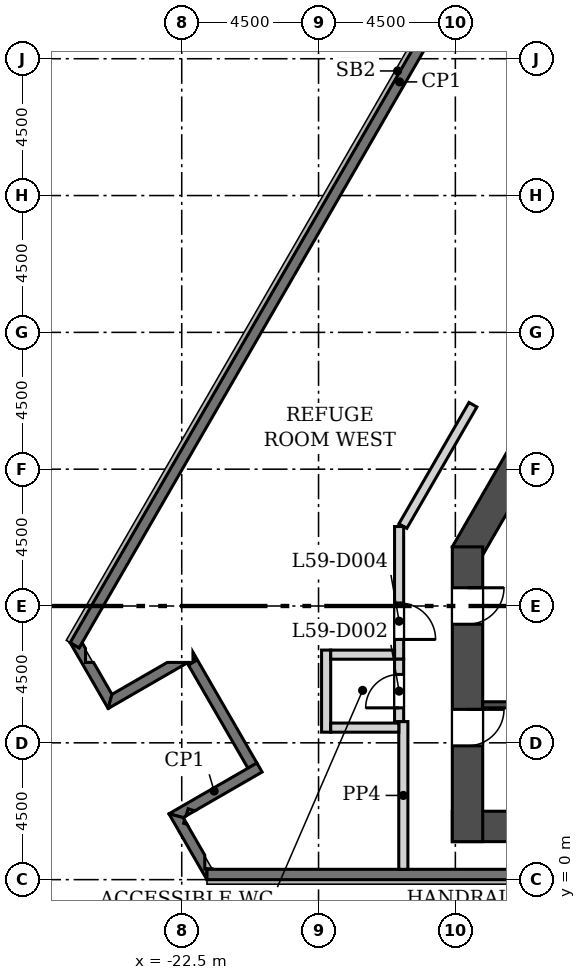
"""IFC4 building model, lengths in metres.
Left out: names, types, materials, properties, quantities, classifications, styles, units other than length and angle.
Written with IfcOpenShell. Run it as: python <this file> out.ifc"""

import sys

from ifc_helpers import new_model, si_unit, direction, frame, frame_2d, origin, place, context, subcontext, project, spatial, polyline, rectangle, outline, extrude, element, fill, save


model = new_model("IFC4")
c1 = context("Model", 3, precision=1e-05, world=origin(), true_north=direction((0.0, 1.0)))
c2 = subcontext(c1, "Body", "Model", "MODEL_VIEW")
j1 = project(units=[si_unit("LENGTHUNIT", "METRE"), si_unit("PLANEANGLEUNIT", "RADIAN")], contexts=[c1])
p1 = place(None, origin())
s1 = spatial("IfcSite", under=j1, at=p1, CompositionType="ELEMENT")
p2 = place(p1, origin())
s2 = spatial("IfcBuilding", under=s1, at=p2, CompositionType="ELEMENT")
p3 = place(p2, frame((0.0, 0.0, 259.5)))
s3 = spatial("IfcBuildingStorey", under=s2, at=p3, CompositionType="ELEMENT", Elevation=259.5)
p4 = place(p3, frame((-13.6, 1.75, 0.0), z_axis=(0.0, 0.0, 1.0), x_axis=(1.0, 0.0, 0.0)))
e1 = element("IfcWall", 1, at=p4, inside=s3, PredefinedType="SHEAR", context=c2, shape_type="SweptSolid", body=[
    extrude(rectangle(XDim=27.2, YDim=1.0, at=frame_2d((13.6, 0.0))), origin(), (0.0, 0.0, 1.0), 7.2),
])
p5 = place(p3, frame((-8.748, 18.35, 0.0), z_axis=(0.0, 0.0, 1.0), x_axis=(-0.499995021168, -0.866028278295, 0.0)))
e2 = element("IfcWall", 2, at=p5, inside=s3, PredefinedType="SHEAR", context=c2, shape_type="SweptSolid", body=[
    extrude(rectangle(XDim=8.839, YDim=1.0, at=frame_2d((4.419, 0.0))), origin(), (0.0, 0.0, 1.0), 7.2),
])
p6 = place(p3, frame((-13.1, 10.945, 0.0), z_axis=(0.0, 0.0, 1.0), x_axis=(0.0, -1.0, 0.0)))
e3 = element("IfcWall", 3, at=p6, inside=s3, PredefinedType="SHEAR", context=c2, shape_type="SweptSolid", body=[
    extrude(rectangle(XDim=9.695, YDim=1.0, at=frame_2d((4.848, 0.0))), origin(), (0.0, 0.0, 1.0), 7.2),
])
p7 = place(p6, frame((5.345, 0.0, 0.0)))
e4 = element("IfcOpeningElement", 4, at=p7, cuts=e3, PredefinedType="OPENING", context=c2, shape_type="SweptSolid", body=[
    extrude(rectangle(XDim=1.2, YDim=2.1, at=frame_2d((0.6, 1.05))), frame((0.0, 0.51, 0.0), z_axis=(0.0, -1.0, 0.0), x_axis=(1.0, 0.0, 0.0)), (0.0, 0.0, 1.0), 1.02),
])
p8 = place(p6, frame((1.345, 0.0, 0.0)))
e5 = element("IfcOpeningElement", 5, at=p8, cuts=e3, PredefinedType="OPENING", context=c2, shape_type="SweptSolid", body=[
    extrude(rectangle(XDim=1.2, YDim=2.1, at=frame_2d((0.6, 1.05))), frame((0.0, 0.51, 0.0), z_axis=(0.0, -1.0, 0.0), x_axis=(1.0, 0.0, 0.0)), (0.0, 0.0, 1.0), 1.02),
])
p9 = place(p3, origin())
e6 = element("IfcWall", 6, at=p9, inside=s3, PredefinedType="SOLIDWALL", context=c2, shape_type="SweptSolid", body=[
    extrude(outline(polyline([(-24.919, 5.628), (-26.17, 7.795), (-26.17, 7.795), (-25.875, 7.625), (-25.777, 7.795), (-25.665, 7.601), (-25.665, 7.144), (-25.401, 7.144), (-24.794, 6.094), (-24.919, 5.628), (-24.919, 5.628)])), origin(), (0.0, 0.0, 1.0), 6.8),
])
p10 = place(p3, origin())
e7 = element("IfcWall", 7, at=p10, inside=s3, PredefinedType="SOLIDWALL", context=c2, shape_type="SweptSolid", body=[
    extrude(outline(polyline([(-22.976, 7.144), (-22.294, 7.144), (-22.321, 7.129), (-24.92, 5.628), (-24.92, 5.628), (-24.795, 6.094), (-22.976, 7.144)])), origin(), (0.0, 0.0, 1.0), 6.8),
])
p11 = place(p3, origin())
e8 = element("IfcWall", 8, at=p11, inside=s3, PredefinedType="SOLIDWALL", context=c2, shape_type="SweptSolid", body=[
    extrude(outline(polyline([(-22.026, 7.299), (-22.13, 7.239), (-22.13, 7.479), (-22.026, 7.299)])), origin(), (0.0, 0.0, 1.0), 6.8),
])
p12 = place(p3, frame((-22.133, 7.143, 0.0), z_axis=(0.0, 0.0, 1.0), x_axis=(0.499979589489, -0.866037187478, 0.0)))
e9 = element("IfcWall", 9, at=p12, inside=s3, PredefinedType="SOLIDWALL", context=c2, shape_type="SweptSolid", body=[
    extrude(rectangle(XDim=3.918, YDim=0.34, at=frame_2d((1.959, 0.0))), origin(), (0.0, 0.0, 1.0), 6.8),
])
p13 = place(p3, origin())
e10 = element("IfcWall", 10, at=p13, inside=s3, PredefinedType="SOLIDWALL", context=c2, shape_type="SweptSolid", body=[
    extrude(outline(polyline([(-22.364, 2.093), (-22.289, 2.332), (-22.068, 2.263), (-22.364, 2.093)])), origin(), (0.0, 0.0, 1.0), 6.0),
])
p14 = place(p3, origin())
e11 = element("IfcWall", 11, at=p14, inside=s3, PredefinedType="SOLIDWALL", context=c2, shape_type="SweptSolid", body=[
    extrude(outline(polyline([(-20.322, 3.666), (-20.027, 3.836), (-19.856, 3.54), (-22.068, 2.263), (-22.289, 2.332), (-22.364, 2.093), (-22.455, 2.04), (-22.92, 2.165), (-22.921, 2.165), (-20.322, 3.666)])), origin(), (0.0, 0.0, 1.0), 6.8),
])
p15 = place(p3, origin())
e12 = element("IfcWall", 12, at=p15, inside=s3, PredefinedType="SOLIDWALL", context=c2, shape_type="SweptSolid", body=[
    extrude(outline(polyline([(-22.327, 1.82), (-22.438, 1.855), (-22.406, 1.957), (-22.327, 1.82)])), origin(), (0.0, 0.0, 1.0), 6.0),
])
p16 = place(p3, origin())
e13 = element("IfcWall", 13, at=p16, inside=s3, PredefinedType="SOLIDWALL", context=c2, shape_type="SweptSolid", body=[
    extrude(outline(polyline([(-21.742, 0.35), (-21.478, 0.35), (-21.472, 0.339), (-21.669, 0.339), (-21.669, -0.001), (-21.669, -0.001), (-22.92, 2.166), (-22.92, 2.166), (-22.455, 2.041), (-22.406, 1.957), (-22.438, 1.855), (-22.327, 1.82), (-21.742, 0.807), (-21.742, 0.35)])), origin(), (0.0, 0.0, 1.0), 6.8),
])
for number, where, z_axis, x_axis in (
    (14, (-21.669, 0.17, 0.0), (0.0, 0.0, 1.0), (1.0, 0.0, 0.0)),
    (15, (-4.353, 45.242, 0.0), (0.0, 0.0, 1.0), (-0.5, -0.866, 0.0)),
):
    element("IfcWall", number, at=place(p3, frame(where, z_axis=z_axis, x_axis=x_axis)), inside=s3, PredefinedType="SOLIDWALL", context=c2, shape_type="SweptSolid", body=[
        extrude(rectangle(XDim=43.339, YDim=0.34, at=frame_2d((21.669, 0.0))), origin(), (0.0, 0.0, 1.0), 6.8),
    ])
p17 = place(p3, frame((-12.6, 5.75, -0.4), z_axis=(0.0, 0.0, 1.0), x_axis=(1.0, 0.0, 0.0)))
e16 = element("IfcWall", 16, at=p17, inside=s3, PredefinedType="SOLIDWALL", context=c2, shape_type="SweptSolid", body=[
    extrude(rectangle(XDim=11.4, YDim=0.2, at=frame_2d((5.7, 0.0))), origin(), (0.0, 0.0, 1.0), 7.2),
])
p18 = place(p3, frame((-15.211, 0.34, 0.0), z_axis=(0.0, 0.0, 1.0), x_axis=(0.0, 1.0, 0.0)))
e17 = element("IfcWall", 17, at=p18, inside=s3, PredefinedType="SOLIDWALL", context=c2, shape_type="SweptSolid", body=[
    extrude(rectangle(XDim=4.859, YDim=0.3, at=frame_2d((2.429, 0.0))), origin(), (0.0, 0.0, 1.0), 6.8),
])
p19 = place(p3, frame((-15.226, 11.629, 0.0), z_axis=(0.0, 0.0, 1.0), x_axis=(0.49997925212, 0.866037382247, 0.0)))
e18 = element("IfcWall", 18, at=p19, inside=s3, PredefinedType="SOLIDWALL", context=c2, shape_type="SweptSolid", body=[
    extrude(rectangle(XDim=4.609, YDim=0.3, at=frame_2d((2.304, 0.0))), origin(), (0.0, 0.0, 1.0), 6.8),
])
p20 = place(p3, frame((-15.35, 7.25, 0.0), z_axis=(0.0, 0.0, 1.0), x_axis=(0.0, 1.0, 0.0)))
e19 = element("IfcWall", 19, at=p20, inside=s3, PredefinedType="SOLIDWALL", context=c2, shape_type="SweptSolid", body=[
    extrude(rectangle(XDim=4.364, YDim=0.3, at=frame_2d((2.182, 0.0))), origin(), (0.0, 0.0, 1.0), 6.8),
])
p21 = place(p20, frame((0.65, 0.0, 0.0)))
e20 = element("IfcOpeningElement", 20, at=p21, cuts=e19, PredefinedType="OPENING", context=c2, shape_type="SweptSolid", body=[
    extrude(rectangle(XDim=1.2, YDim=2.1, at=frame_2d((0.6, 1.05))), frame((0.0, 0.16, 0.0), z_axis=(0.0, -1.0, 0.0), x_axis=(1.0, 0.0, 0.0)), (0.0, 0.0, 1.0), 0.32),
])
p22 = place(p3, frame((-17.75, 4.85, 0.0), z_axis=(0.0, 0.0, 1.0), x_axis=(0.0, 1.0, 0.0)))
e21 = element("IfcWall", 21, at=p22, inside=s3, PredefinedType="SOLIDWALL", context=c2, shape_type="SweptSolid", body=[
    extrude(rectangle(XDim=2.7, YDim=0.3, at=frame_2d((1.35, 0.0))), origin(), (0.0, 0.0, 1.0), 6.8),
])
p23 = place(p3, frame((-15.36, 5.0, 0.0), z_axis=(0.0, 0.0, 1.0), x_axis=(-1.0, 0.0, 0.0)))
e22 = element("IfcWall", 22, at=p23, inside=s3, PredefinedType="SOLIDWALL", context=c2, shape_type="SweptSolid", body=[
    extrude(rectangle(XDim=2.24, YDim=0.3, at=frame_2d((1.12, 0.0))), origin(), (0.0, 0.0, 1.0), 6.8),
])
p24 = place(p3, frame((-17.6, 7.4, 0.0), z_axis=(0.0, 0.0, 1.0), x_axis=(1.0, 0.0, 0.0)))
e23 = element("IfcWall", 23, at=p24, inside=s3, PredefinedType="SOLIDWALL", context=c2, shape_type="SweptSolid", body=[
    extrude(rectangle(XDim=2.1, YDim=0.3, at=frame_2d((1.05, 0.0))), origin(), (0.0, 0.0, 1.0), 6.8),
])
p25 = place(p3, frame((-15.35, 5.199, 0.0), z_axis=(0.0, 0.0, 1.0), x_axis=(0.0, 1.0, 0.0)))
e24 = element("IfcWall", 24, at=p25, inside=s3, PredefinedType="SOLIDWALL", context=c2, shape_type="SweptSolid", body=[
    extrude(rectangle(XDim=2.051, YDim=0.3, at=frame_2d((1.025, 0.0))), origin(), (0.0, 0.0, 1.0), 6.8),
])
p26 = place(p25, frame((0.451, 0.0, 0.0)))
e25 = element("IfcOpeningElement", 25, at=p26, cuts=e24, PredefinedType="OPENING", context=c2, shape_type="SweptSolid", body=[
    extrude(rectangle(XDim=1.1, YDim=2.1, at=frame_2d((0.55, 1.05))), frame((0.0, 0.16, 0.0), z_axis=(0.0, -1.0, 0.0), x_axis=(1.0, 0.0, 0.0)), (0.0, 0.0, 1.0), 0.32),
])
p27 = place(p7, origin())
e26 = element("IfcDoor", 26, at=p27, inside=s3, OperationType="SINGLE_SWING_LEFT", PredefinedType="DOOR", context=c2, shape_type="SweptSolid", body=[
    extrude(rectangle(XDim=1.2, YDim=2.1, at=frame_2d((0.6, 1.05))), frame((0.0, 0.025, 0.0), z_axis=(0.0, -1.0, 0.0), x_axis=(1.0, 0.0, 0.0)), (0.0, 0.0, 1.0), 0.05),
])
fill(e4, e26)
p28 = place(p8, origin())
e27 = element("IfcDoor", 27, at=p28, inside=s3, OperationType="SINGLE_SWING_LEFT", PredefinedType="DOOR", context=c2, shape_type="SweptSolid", body=[
    extrude(rectangle(XDim=1.2, YDim=2.1, at=frame_2d((0.6, 1.05))), frame((0.0, 0.025, 0.0), z_axis=(0.0, -1.0, 0.0), x_axis=(1.0, 0.0, 0.0)), (0.0, 0.0, 1.0), 0.05),
])
fill(e5, e27)
p29 = place(p26, origin())
e28 = element("IfcDoor", 28, at=p29, inside=s3, OperationType="SINGLE_SWING_LEFT", PredefinedType="DOOR", context=c2, shape_type="SweptSolid", body=[
    extrude(rectangle(XDim=1.1, YDim=2.1, at=frame_2d((0.55, 1.05))), frame((0.0, 0.025, 0.0), z_axis=(0.0, -1.0, 0.0), x_axis=(1.0, 0.0, 0.0)), (0.0, 0.0, 1.0), 0.05),
])
fill(e25, e28)
p30 = place(p21, frame((1.2, 0.0, 0.0), z_axis=(0.0, 0.0, 1.0), x_axis=(-1.0, 0.0, 0.0)))
e29 = element("IfcDoor", 29, at=p30, inside=s3, OperationType="SINGLE_SWING_RIGHT", PredefinedType="DOOR", context=c2, shape_type="SweptSolid", body=[
    extrude(rectangle(XDim=1.2, YDim=2.1, at=frame_2d((0.6, 1.05))), frame((0.0, 0.025, 0.0), z_axis=(0.0, -1.0, 0.0), x_axis=(1.0, 0.0, 0.0)), (0.0, 0.0, 1.0), 0.05),
])
fill(e20, e29)
save(model, sys.argv[1])
